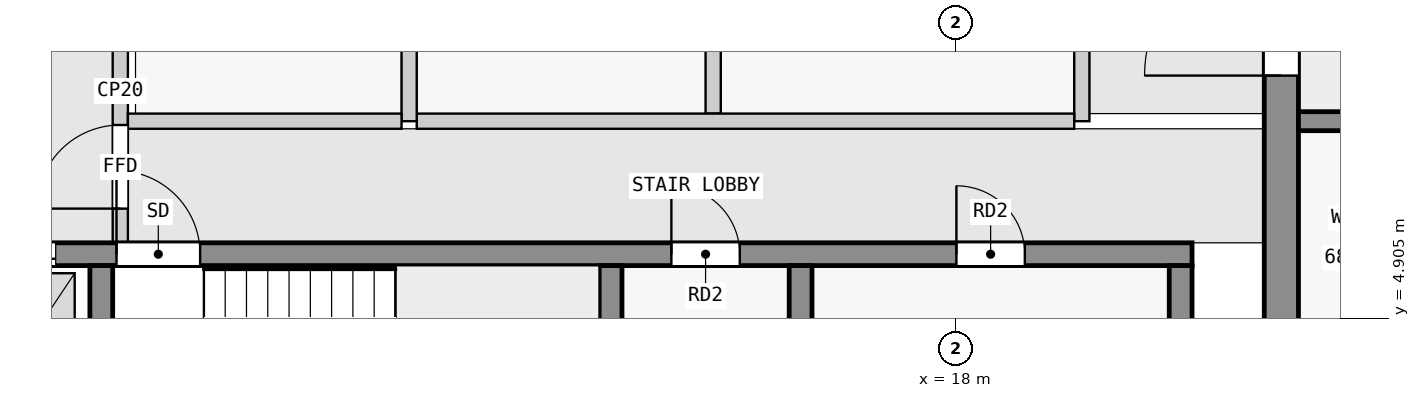
"""IFC4 building model, lengths in metres.
Left out: names, types, materials, properties, quantities, classifications, styles, units other than length and angle.
Written with IfcOpenShell. Run it as: python <this file> out.ifc"""

import sys

from ifc_helpers import new_model, si_unit, direction, frame, frame_2d, origin, place, context, subcontext, project, spatial, rectangle, extrude, element, fill, save


model = new_model("IFC4")
c1 = context("Model", 3, precision=1e-05, world=origin(), true_north=direction((0.0, 1.0)))
c2 = subcontext(c1, "Body", "Model", "MODEL_VIEW")
j1 = project(units=[si_unit("LENGTHUNIT", "METRE"), si_unit("PLANEANGLEUNIT", "RADIAN")], contexts=[c1])
p1 = place(None, origin())
s1 = spatial("IfcSite", under=j1, at=p1, CompositionType="ELEMENT")
p2 = place(p1, origin())
s2 = spatial("IfcBuilding", under=s1, at=p2, CompositionType="ELEMENT")
p3 = place(p2, frame((0.0, 0.0, 259.9)))
s3 = spatial("IfcBuildingStorey", under=s2, at=p3, CompositionType="ELEMENT", Elevation=259.9)
p4 = place(p3, frame((22.275, 2.5, 0.0), z_axis=(0.0, 0.0, 1.0), x_axis=(0.0, 1.0, 0.0)))
e1 = element("IfcWall", 1, at=p4, inside=s3, PredefinedType="SHEAR", context=c2, shape_type="SweptSolid", body=[
    extrude(rectangle(XDim=15.05, YDim=0.45, at=frame_2d((7.525, 0.0))), origin(), (0.0, 0.0, 1.0), 3.25),
])
p5 = place(p4, frame((5.6, 0.0, 0.0)))
e2 = element("IfcOpeningElement", 2, at=p5, cuts=e1, PredefinedType="OPENING", context=c2, shape_type="SweptSolid", body=[
    extrude(rectangle(XDim=1.8, YDim=2.1, at=frame_2d((0.9, 1.05))), frame((0.0, 0.235, 0.0), z_axis=(0.0, -1.0, 0.0), x_axis=(1.0, 0.0, 0.0)), (0.0, 0.0, 1.0), 0.47),
])
for number, where, z_axis, x_axis in (
    (3, (6.75, 2.8, 0.0), (0.0, 0.0, 1.0), (0.0, 1.0, 0.0)),
    (4, (13.45, 2.8, 0.0), (0.0, 0.0, 1.0), (0.0, 1.0, 0.0)),
    (5, (15.95, 2.8, 0.0), (0.0, 0.0, 1.0), (0.0, 1.0, 0.0)),
    (6, (20.95, 2.8, 0.0), (0.0, 0.0, 1.0), (0.0, 1.0, 0.0)),
):
    element("IfcWall", number, at=place(p3, frame(where, z_axis=z_axis, x_axis=x_axis)), inside=s3, PredefinedType="SHEAR", context=c2, shape_type="SweptSolid", body=[
        extrude(rectangle(XDim=2.8, YDim=0.3, at=frame_2d((1.4, 0.0))), origin(), (0.0, 0.0, 1.0), 3.25),
    ])
p6 = place(p3, frame((2.3, 5.75, 0.0), z_axis=(0.0, 0.0, 1.0), x_axis=(1.0, 0.0, 0.0)))
e7 = element("IfcWall", 7, at=p6, inside=s3, PredefinedType="SHEAR", context=c2, shape_type="SweptSolid", body=[
    extrude(rectangle(XDim=18.8, YDim=0.3, at=frame_2d((9.4, 0.0))), origin(), (0.0, 0.0, 1.0), 3.25),
])
p7 = place(p6, frame((4.65, 0.0, 0.0)))
e8 = element("IfcOpeningElement", 8, at=p7, cuts=e7, PredefinedType="OPENING", context=c2, shape_type="SweptSolid", body=[
    extrude(rectangle(XDim=1.1, YDim=2.1, at=frame_2d((0.55, 1.05))), frame((0.0, 0.16, 0.0), z_axis=(0.0, -1.0, 0.0), x_axis=(1.0, 0.0, 0.0)), (0.0, 0.0, 1.0), 0.32),
])
p8 = place(p6, frame((0.45, 0.0, 0.0)))
e9 = element("IfcOpeningElement", 9, at=p8, cuts=e7, PredefinedType="OPENING", context=c2, shape_type="SweptSolid", body=[
    extrude(rectangle(XDim=1.1, YDim=2.1, at=frame_2d((0.55, 1.05))), frame((0.0, 0.16, 0.0), z_axis=(0.0, -1.0, 0.0), x_axis=(1.0, 0.0, 0.0)), (0.0, 0.0, 1.0), 0.32),
])
p9 = place(p6, frame((2.75, 0.0, 0.0)))
e10 = element("IfcOpeningElement", 10, at=p9, cuts=e7, PredefinedType="OPENING", context=c2, shape_type="SweptSolid", body=[
    extrude(rectangle(XDim=1.1, YDim=2.1, at=frame_2d((0.55, 1.05))), frame((0.0, 0.16, 0.0), z_axis=(0.0, -1.0, 0.0), x_axis=(1.0, 0.0, 0.0)), (0.0, 0.0, 1.0), 0.32),
])
p10 = place(p6, frame((11.95, 0.0, 0.0)))
e11 = element("IfcOpeningElement", 11, at=p10, cuts=e7, PredefinedType="OPENING", context=c2, shape_type="SweptSolid", body=[
    extrude(rectangle(XDim=0.9, YDim=2.1, at=frame_2d((0.45, 1.05))), frame((0.0, 0.16, 0.0), z_axis=(0.0, -1.0, 0.0), x_axis=(1.0, 0.0, 0.0)), (0.0, 0.0, 1.0), 0.32),
])
p11 = place(p6, frame((15.7, 0.0, 0.0)))
e12 = element("IfcOpeningElement", 12, at=p11, cuts=e7, PredefinedType="OPENING", context=c2, shape_type="SweptSolid", body=[
    extrude(rectangle(XDim=0.9, YDim=2.1, at=frame_2d((0.45, 1.05))), frame((0.0, 0.16, 0.0), z_axis=(0.0, -1.0, 0.0), x_axis=(1.0, 0.0, 0.0)), (0.0, 0.0, 1.0), 0.32),
])
p12 = place(p3, frame((22.5, 7.5, 0.0), z_axis=(0.0, 0.0, 1.0), x_axis=(1.0, 0.0, 0.0)))
e13 = element("IfcWall", 13, at=p12, inside=s3, PredefinedType="SHEAR", context=c2, shape_type="SweptSolid", body=[
    extrude(rectangle(XDim=22.5, YDim=0.25, at=frame_2d((11.25, 0.0))), origin(), (0.0, 0.0, 1.0), 3.25),
])
p13 = place(p12, frame((1.75, 0.0, 0.0)))
e14 = element("IfcOpeningElement", 14, at=p13, cuts=e13, PredefinedType="OPENING", context=c2, shape_type="SweptSolid", body=[
    extrude(rectangle(XDim=1.0, YDim=2.1, at=frame_2d((0.5, 1.05))), frame((0.0, 0.135, 0.0), z_axis=(0.0, -1.0, 0.0), x_axis=(1.0, 0.0, 0.0)), (0.0, 0.0, 1.0), 0.27),
])
p14 = place(p12, frame((5.85, 0.0, 0.0)))
e15 = element("IfcOpeningElement", 15, at=p14, cuts=e13, PredefinedType="OPENING", context=c2, shape_type="SweptSolid", body=[
    extrude(rectangle(XDim=1.8, YDim=2.1, at=frame_2d((0.9, 1.05))), frame((0.0, 0.135, 0.0), z_axis=(0.0, -1.0, 0.0), x_axis=(1.0, 0.0, 0.0)), (0.0, 0.0, 1.0), 0.27),
])
p15 = place(p12, frame((10.75, 0.0, 0.0)))
e16 = element("IfcOpeningElement", 16, at=p15, cuts=e13, PredefinedType="OPENING", context=c2, shape_type="SweptSolid", body=[
    extrude(rectangle(XDim=1.0, YDim=2.1, at=frame_2d((0.5, 1.05))), frame((0.0, 0.135, 0.0), z_axis=(0.0, -1.0, 0.0), x_axis=(1.0, 0.0, 0.0)), (0.0, 0.0, 1.0), 0.27),
])
p16 = place(p12, frame((15.25, 0.0, 0.0)))
e17 = element("IfcOpeningElement", 17, at=p16, cuts=e13, PredefinedType="OPENING", context=c2, shape_type="SweptSolid", body=[
    extrude(rectangle(XDim=1.0, YDim=2.1, at=frame_2d((0.5, 1.05))), frame((0.0, 0.135, 0.0), z_axis=(0.0, -1.0, 0.0), x_axis=(1.0, 0.0, 0.0)), (0.0, 0.0, 1.0), 0.27),
])
p17 = place(p12, frame((18.75, 0.0, 0.0)))
e18 = element("IfcOpeningElement", 18, at=p17, cuts=e13, PredefinedType="OPENING", context=c2, shape_type="SweptSolid", body=[
    extrude(rectangle(XDim=0.9, YDim=2.1, at=frame_2d((0.45, 1.05))), frame((0.0, 0.135, 0.0), z_axis=(0.0, -1.0, 0.0), x_axis=(1.0, 0.0, 0.0)), (0.0, 0.0, 1.0), 0.27),
])
p18 = place(p12, frame((20.95, 0.0, 0.0)))
e19 = element("IfcOpeningElement", 19, at=p18, cuts=e13, PredefinedType="OPENING", context=c2, shape_type="SweptSolid", body=[
    extrude(rectangle(XDim=1.0, YDim=2.1, at=frame_2d((0.5, 1.05))), frame((0.0, 0.135, 0.0), z_axis=(0.0, -1.0, 0.0), x_axis=(1.0, 0.0, 0.0)), (0.0, 0.0, 1.0), 0.27),
])
p19 = place(p3, frame((7.0, 5.9, 0.0), z_axis=(0.0, 0.0, 1.0), x_axis=(0.0, 1.0, 0.0)))
e20 = element("IfcWall", 20, at=p19, inside=s3, PredefinedType="PARTITIONING", context=c2, shape_type="SweptSolid", body=[
    extrude(rectangle(XDim=4.0, YDim=0.2, at=frame_2d((2.0, 0.0))), origin(), (0.0, 0.0, 1.0), 3.25),
])
p20 = place(p19, frame((0.45, 0.0, 0.0)))
e21 = element("IfcOpeningElement", 21, at=p20, cuts=e20, PredefinedType="OPENING", context=c2, shape_type="SweptSolid", body=[
    extrude(rectangle(XDim=1.1, YDim=2.1, at=frame_2d((0.55, 1.05))), frame((0.0, 0.11, 0.0), z_axis=(0.0, -1.0, 0.0), x_axis=(1.0, 0.0, 0.0)), (0.0, 0.0, 1.0), 0.22),
])
p21 = place(p3, frame((7.1, 7.5, 0.0), z_axis=(0.0, 0.0, 1.0), x_axis=(1.0, 0.0, 0.0)))
e22 = element("IfcWall", 22, at=p21, inside=s3, PredefinedType="PARTITIONING", context=c2, shape_type="SweptSolid", body=[
    extrude(rectangle(XDim=3.6, YDim=0.2, at=frame_2d((1.8, 0.0))), origin(), (0.0, 0.0, 1.0), 3.25),
])
p22 = place(p3, frame((10.8, 7.5, 0.0), z_axis=(0.0, 0.0, 1.0), x_axis=(0.0, 1.0, 0.0)))
e23 = element("IfcWall", 23, at=p22, inside=s3, PredefinedType="PARTITIONING", context=c2, shape_type="SweptSolid", body=[
    extrude(rectangle(XDim=4.7, YDim=0.2, at=frame_2d((2.35, 0.0))), origin(), (0.0, 0.0, 1.0), 3.25),
])
p23 = place(p3, frame((10.9, 7.5, 0.0), z_axis=(0.0, 0.0, 1.0), x_axis=(1.0, 0.0, 0.0)))
e24 = element("IfcWall", 24, at=p23, inside=s3, PredefinedType="PARTITIONING", context=c2, shape_type="SweptSolid", body=[
    extrude(rectangle(XDim=8.65, YDim=0.2, at=frame_2d((4.325, 0.0))), origin(), (0.0, 0.0, 1.0), 3.25),
])
p24 = place(p3, frame((19.65, 7.5, 0.0), z_axis=(0.0, 0.0, 1.0), x_axis=(0.0, 1.0, 0.0)))
e25 = element("IfcWall", 25, at=p24, inside=s3, PredefinedType="PARTITIONING", context=c2, shape_type="SweptSolid", body=[
    extrude(rectangle(XDim=4.7, YDim=0.2, at=frame_2d((2.35, 0.0))), origin(), (0.0, 0.0, 1.0), 3.25),
])
p25 = place(p3, frame((14.8, 7.6, 0.0), z_axis=(0.0, 0.0, 1.0), x_axis=(0.0, 1.0, 0.0)))
e26 = element("IfcWall", 26, at=p25, inside=s3, PredefinedType="PARTITIONING", context=c2, shape_type="SweptSolid", body=[
    extrude(rectangle(XDim=4.5, YDim=0.2, at=frame_2d((2.25, 0.0))), origin(), (0.0, 0.0, 1.0), 3.25),
])
p26 = place(p20, origin())
e27 = element("IfcDoor", 27, at=p26, inside=s3, OperationType="SINGLE_SWING_LEFT", PredefinedType="DOOR", context=c2, shape_type="SweptSolid", body=[
    extrude(rectangle(XDim=1.1, YDim=2.1, at=frame_2d((0.55, 1.05))), frame((0.0, 0.025, 0.0), z_axis=(0.0, -1.0, 0.0), x_axis=(1.0, 0.0, 0.0)), (0.0, 0.0, 1.0), 0.05),
])
fill(e21, e27)
p27 = place(p7, origin())
e28 = element("IfcDoor", 28, at=p27, inside=s3, OperationType="SINGLE_SWING_LEFT", PredefinedType="DOOR", context=c2, shape_type="SweptSolid", body=[
    extrude(rectangle(XDim=1.1, YDim=2.1, at=frame_2d((0.55, 1.05))), frame((0.0, 0.025, 0.0), z_axis=(0.0, -1.0, 0.0), x_axis=(1.0, 0.0, 0.0)), (0.0, 0.0, 1.0), 0.05),
])
fill(e8, e28)
p28 = place(p9, origin())
e29 = element("IfcDoor", 29, at=p28, inside=s3, OperationType="DOUBLE_DOOR_SLIDING", PredefinedType="DOOR", context=c2, shape_type="SweptSolid", body=[
    extrude(rectangle(XDim=1.1, YDim=2.1, at=frame_2d((0.55, 1.05))), frame((0.0, 0.025, 0.0), z_axis=(0.0, -1.0, 0.0), x_axis=(1.0, 0.0, 0.0)), (0.0, 0.0, 1.0), 0.05),
])
fill(e10, e29)
p29 = place(p5, origin())
e30 = element("IfcDoor", 30, at=p29, inside=s3, OperationType="DOUBLE_DOOR_SINGLE_SWING", PredefinedType="DOOR", context=c2, shape_type="SweptSolid", body=[
    extrude(rectangle(XDim=1.8, YDim=2.1, at=frame_2d((0.9, 1.05))), frame((0.0, 0.025, 0.0), z_axis=(0.0, -1.0, 0.0), x_axis=(1.0, 0.0, 0.0)), (0.0, 0.0, 1.0), 0.05),
])
fill(e2, e30)
p30 = place(p10, origin())
e31 = element("IfcDoor", 31, at=p30, inside=s3, OperationType="SINGLE_SWING_LEFT", PredefinedType="DOOR", context=c2, shape_type="SweptSolid", body=[
    extrude(rectangle(XDim=0.9, YDim=2.1, at=frame_2d((0.45, 1.05))), frame((0.0, 0.025, 0.0), z_axis=(0.0, -1.0, 0.0), x_axis=(1.0, 0.0, 0.0)), (0.0, 0.0, 1.0), 0.05),
])
fill(e11, e31)
p31 = place(p11, origin())
e32 = element("IfcDoor", 32, at=p31, inside=s3, OperationType="SINGLE_SWING_LEFT", PredefinedType="DOOR", context=c2, shape_type="SweptSolid", body=[
    extrude(rectangle(XDim=0.9, YDim=2.1, at=frame_2d((0.45, 1.05))), frame((0.0, 0.025, 0.0), z_axis=(0.0, -1.0, 0.0), x_axis=(1.0, 0.0, 0.0)), (0.0, 0.0, 1.0), 0.05),
])
fill(e12, e32)
save(model, sys.argv[1])
